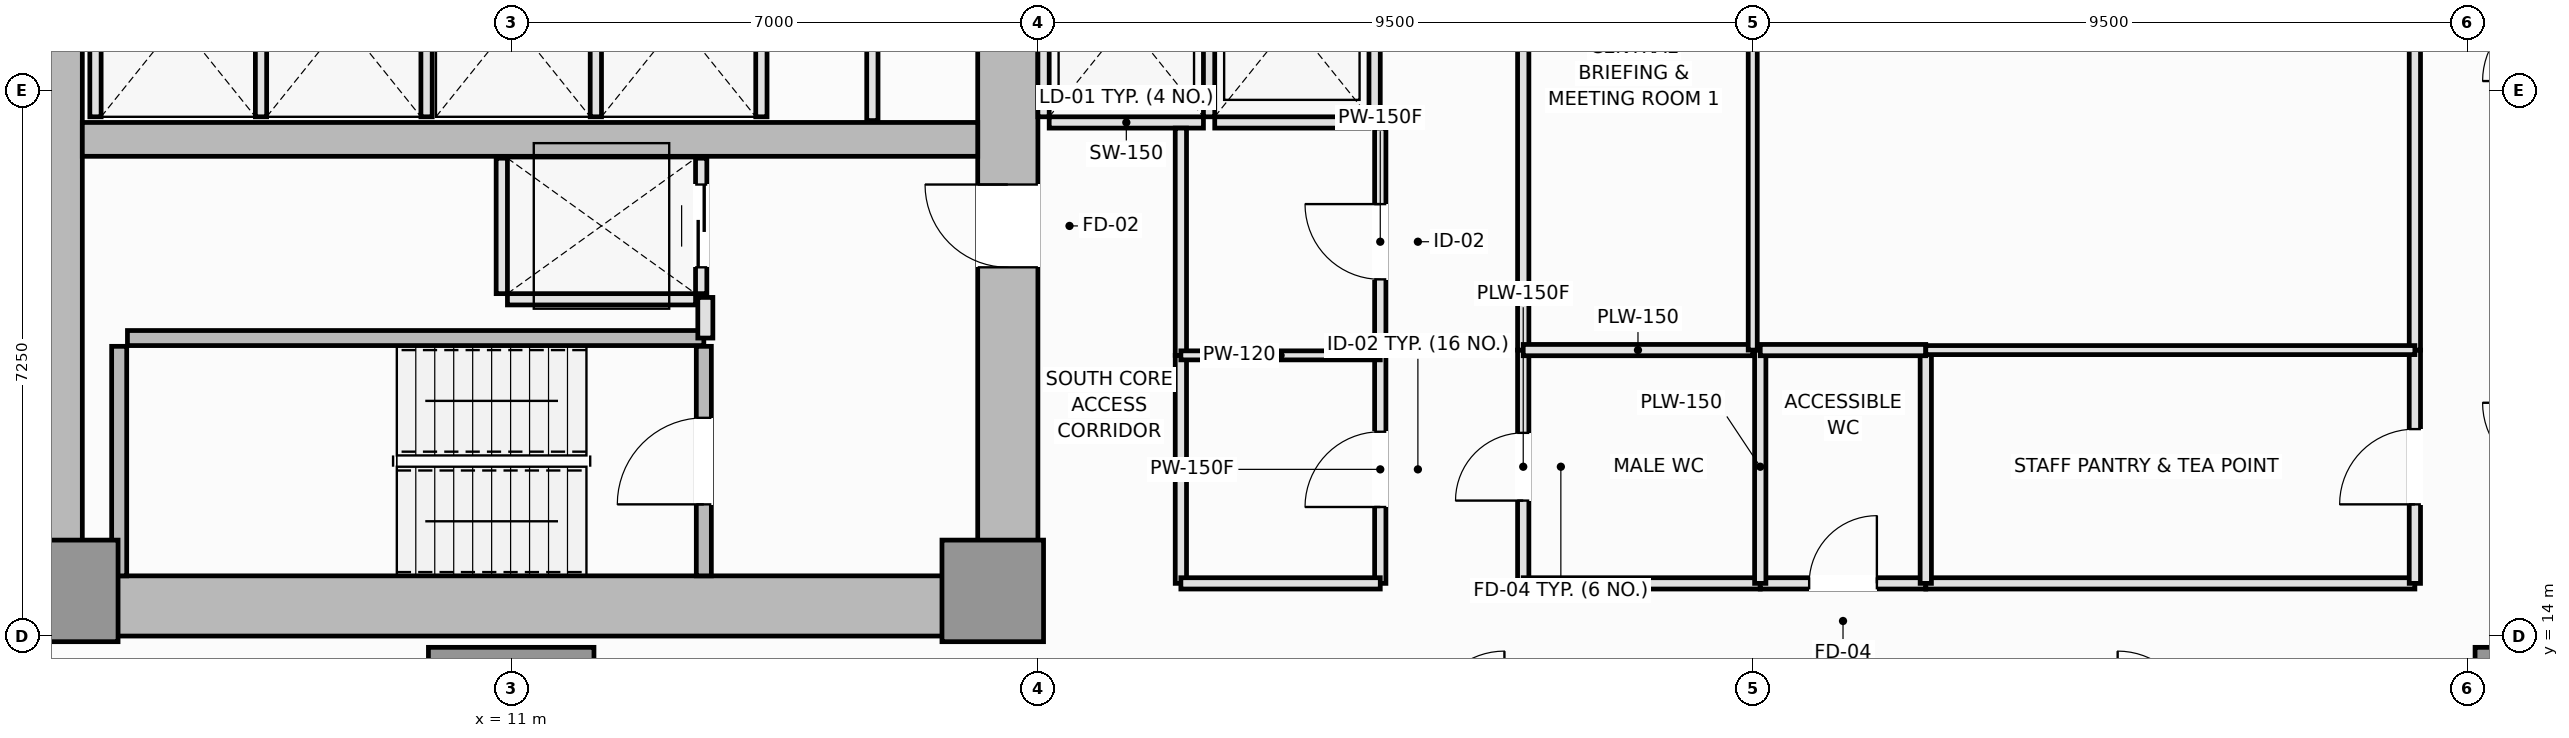
"""IFC4 building model, lengths in metres.
Left out: names, types, materials, properties, quantities, classifications, styles, units other than length and angle.
Written with IfcOpenShell. Run it as: python <this file> out.ifc"""

import sys

from ifc_helpers import new_model, si_unit, direction, frame, frame_2d, origin, origin_2d, place, context, subcontext, project, spatial, rectangle, extrude, element, fill, save


model = new_model("IFC4")
c1 = context("Model", 3, precision=1e-05, world=origin(), true_north=direction((0.0, 1.0)))
c2 = subcontext(c1, "Body", "Model", "MODEL_VIEW")
j1 = project(units=[si_unit("LENGTHUNIT", "METRE"), si_unit("PLANEANGLEUNIT", "RADIAN")], contexts=[c1])
p1 = place(None, origin())
s1 = spatial("IfcSite", under=j1, at=p1, CompositionType="ELEMENT")
p2 = place(p1, origin())
s2 = spatial("IfcBuilding", under=s1, at=p2, CompositionType="ELEMENT")
p3 = place(p2, frame((0.0, 0.0, 25.6)))
s3 = spatial("IfcBuildingStorey", under=s2, at=p3, CompositionType="ELEMENT", Elevation=25.6)
p4 = place(p3, frame((4.5, 14.4, 0.0), z_axis=(0.0, 0.0, 1.0), x_axis=(1.0, 0.0, 0.0)))
e1 = element("IfcWall", 1, at=p4, inside=s3, PredefinedType="SHEAR", context=c2, shape_type="SweptSolid", body=[
    extrude(rectangle(XDim=13.5, YDim=0.8, at=frame_2d((6.75, 0.0))), origin(), (0.0, 0.0, 1.0), 3.55),
])
p5 = place(p3, frame((4.9, 14.8, 0.0), z_axis=(0.0, 0.0, 1.0), x_axis=(0.0, 1.0, 0.0)))
e2 = element("IfcWall", 2, at=p5, inside=s3, PredefinedType="SHEAR", context=c2, shape_type="SweptSolid", body=[
    extrude(rectangle(XDim=20.9, YDim=0.8, at=frame_2d((10.45, 0.0))), origin(), (0.0, 0.0, 1.0), 3.55),
])
p6 = place(p3, frame((17.6, 14.8, 0.0), z_axis=(0.0, 0.0, 1.0), x_axis=(0.0, 1.0, 0.0)))
e3 = element("IfcWall", 3, at=p6, inside=s3, PredefinedType="SHEAR", context=c2, shape_type="SweptSolid", body=[
    extrude(rectangle(XDim=8.65, YDim=0.8, at=frame_2d((4.325, 0.0))), origin(), (0.0, 0.0, 1.0), 3.55),
])
p7 = place(p6, frame((4.1, 0.0, 0.0)))
e4 = element("IfcOpeningElement", 4, at=p7, cuts=e3, PredefinedType="OPENING", context=c2, shape_type="SweptSolid", body=[
    extrude(rectangle(XDim=1.1, YDim=2.15, at=frame_2d((0.55, 1.075))), frame((0.0, 0.41, 0.0), z_axis=(0.0, -1.0, 0.0), x_axis=(1.0, 0.0, 0.0)), (0.0, 0.0, 1.0), 0.82),
])
p8 = place(p3, frame((5.3, 20.6, 0.0), z_axis=(0.0, 0.0, 1.0), x_axis=(1.0, 0.0, 0.0)))
e5 = element("IfcWall", 5, at=p8, inside=s3, PredefinedType="SHEAR", context=c2, shape_type="SweptSolid", body=[
    extrude(rectangle(XDim=11.9, YDim=0.45, at=frame_2d((5.95, 0.0))), origin(), (0.0, 0.0, 1.0), 3.55),
])
for number, where, z_axis, x_axis in (
    (6, (5.1, 14.6, 0.0), (0.0, 0.0, 1.0), (1.0, 0.0, 0.0)),
    (7, (17.4, 14.6, 0.0), (0.0, 0.0, 1.0), (1.0, 0.0, 0.0)),
):
    element("IfcColumn", number, at=place(p3, frame(where, z_axis=z_axis, x_axis=x_axis)), inside=s3, PredefinedType="PILASTER", context=c2, shape_type="SweptSolid", body=[
        extrude(rectangle(XDim=1.35, YDim=1.35, at=origin_2d()), origin(), (0.0, 0.0, 1.0), 3.55),
    ])
for number, where, z_axis, x_axis in (
    (8, (11.0, 12.75, 0.0), (0.0, 0.0, 1.0), (1.0, 0.0, 0.0)),
    (9, (38.2, 12.75, 0.0), (0.0, 0.0, 1.0), (1.0, 0.0, 0.0)),
):
    element("IfcColumn", number, at=place(p3, frame(where, z_axis=z_axis, x_axis=x_axis)), inside=s3, PredefinedType="COLUMN", context=c2, shape_type="SweptSolid", body=[
        extrude(rectangle(XDim=2.2, YDim=2.2, at=origin_2d()), origin(), (0.0, 0.0, 1.0), 3.55),
    ])
p9 = place(p3, frame((5.79, 14.8, 0.0), z_axis=(0.0, 0.0, 1.0), x_axis=(0.0, 1.0, 0.0)))
e10 = element("IfcWall", 10, at=p9, inside=s3, PredefinedType="SOLIDWALL", context=c2, shape_type="SweptSolid", body=[
    extrude(rectangle(XDim=3.05, YDim=0.2, at=frame_2d((1.525, 0.0))), origin(), (0.0, 0.0, 1.0), 3.55),
])
p10 = place(p3, frame((5.9, 17.96, 0.0), z_axis=(0.0, 0.0, 1.0), x_axis=(1.0, 0.0, 0.0)))
e11 = element("IfcWall", 11, at=p10, inside=s3, PredefinedType="SOLIDWALL", context=c2, shape_type="SweptSolid", body=[
    extrude(rectangle(XDim=7.66, YDim=0.2, at=frame_2d((3.83, 0.0))), origin(), (0.0, 0.0, 1.0), 3.55),
])
p11 = place(p3, frame((13.56, 14.8, 0.0), z_axis=(0.0, 0.0, 1.0), x_axis=(0.0, 1.0, 0.0)))
e12 = element("IfcWall", 12, at=p11, inside=s3, PredefinedType="SOLIDWALL", context=c2, shape_type="SweptSolid", body=[
    extrude(rectangle(XDim=3.05, YDim=0.2, at=frame_2d((1.525, 0.0))), origin(), (0.0, 0.0, 1.0), 3.55),
])
p12 = place(p11, frame((0.95, 0.0, 0.0)))
e13 = element("IfcOpeningElement", 13, at=p12, cuts=e12, PredefinedType="OPENING", context=c2, shape_type="SweptSolid", body=[
    extrude(rectangle(XDim=1.15, YDim=2.15, at=frame_2d((0.575, 1.075))), frame((0.0, 0.11, 0.0), z_axis=(0.0, -1.0, 0.0), x_axis=(1.0, 0.0, 0.0)), (0.0, 0.0, 1.0), 0.22),
])
p13 = place(p3, frame((18.15, 20.825, 0.0), z_axis=(0.0, 0.0, 1.0), x_axis=(1.0, 0.0, 0.0)))
e14 = element("IfcWall", 14, at=p13, inside=s3, PredefinedType="PARTITIONING", context=c2, shape_type="SweptSolid", body=[
    extrude(rectangle(XDim=2.05, YDim=0.15, at=frame_2d((1.025, 0.0))), origin(), (0.0, 0.0, 1.0), 3.37),
])
for number, where, z_axis, x_axis in (
    (15, (18.075, 20.9, 0.0), (0.0, 0.0, 1.0), (0.0, 1.0, 0.0)),
    (16, (20.275, 20.9, 0.0), (0.0, 0.0, 1.0), (0.0, 1.0, 0.0)),
):
    element("IfcWall", number, at=place(p3, frame(where, z_axis=z_axis, x_axis=x_axis)), inside=s3, PredefinedType="PARTITIONING", context=c2, shape_type="SweptSolid", body=[
        extrude(rectangle(XDim=2.55, YDim=0.15, at=frame_2d((1.275, 0.0))), origin(), (0.0, 0.0, 1.0), 3.37),
    ])
p14 = place(p3, frame((20.35, 20.825, 0.0), z_axis=(0.0, 0.0, 1.0), x_axis=(1.0, 0.0, 0.0)))
e17 = element("IfcWall", 17, at=p14, inside=s3, PredefinedType="PARTITIONING", context=c2, shape_type="SweptSolid", body=[
    extrude(rectangle(XDim=2.05, YDim=0.15, at=frame_2d((1.025, 0.0))), origin(), (0.0, 0.0, 1.0), 3.37),
])
for number, where, z_axis, x_axis in (
    (18, (22.475, 20.9, 0.0), (0.0, 0.0, 1.0), (0.0, 1.0, 0.0)),
    (19, (5.475, 20.9, 0.0), (0.0, 0.0, 1.0), (0.0, 1.0, 0.0)),
    (20, (7.675, 20.9, 0.0), (0.0, 0.0, 1.0), (0.0, 1.0, 0.0)),
    (21, (9.875, 20.9, 0.0), (0.0, 0.0, 1.0), (0.0, 1.0, 0.0)),
    (22, (12.125, 20.9, 0.0), (0.0, 0.0, 1.0), (0.0, 1.0, 0.0)),
    (23, (14.325, 20.9, 0.0), (0.0, 0.0, 1.0), (0.0, 1.0, 0.0)),
):
    element("IfcWall", number, at=place(p3, frame(where, z_axis=z_axis, x_axis=x_axis)), inside=s3, PredefinedType="PARTITIONING", context=c2, shape_type="SweptSolid", body=[
        extrude(rectangle(XDim=2.55, YDim=0.15, at=frame_2d((1.275, 0.0))), origin(), (0.0, 0.0, 1.0), 3.37),
    ])
p15 = place(p3, frame((10.95, 18.475, 0.0), z_axis=(0.0, 0.0, 1.0), x_axis=(1.0, 0.0, 0.0)))
e24 = element("IfcWall", 24, at=p15, inside=s3, PredefinedType="PARTITIONING", context=c2, shape_type="SweptSolid", body=[
    extrude(rectangle(XDim=2.5, YDim=0.15, at=frame_2d((1.25, 0.0))), origin(), (0.0, 0.0, 1.0), 3.37),
])
p16 = place(p3, frame((10.875, 18.55, 0.0), z_axis=(0.0, 0.0, 1.0), x_axis=(0.0, 1.0, 0.0)))
e25 = element("IfcWall", 25, at=p16, inside=s3, PredefinedType="PARTITIONING", context=c2, shape_type="SweptSolid", body=[
    extrude(rectangle(XDim=1.8, YDim=0.15, at=frame_2d((0.9, 0.0))), origin(), (0.0, 0.0, 1.0), 3.37),
])
p17 = place(p3, frame((13.525, 18.55, 0.0), z_axis=(0.0, 0.0, 1.0), x_axis=(0.0, 1.0, 0.0)))
e26 = element("IfcWall", 26, at=p17, inside=s3, PredefinedType="PARTITIONING", context=c2, shape_type="SweptSolid", body=[
    extrude(rectangle(XDim=1.8, YDim=0.15, at=frame_2d((0.9, 0.0))), origin(), (0.0, 0.0, 1.0), 3.37),
])
p18 = place(p17, frame((0.35, 0.0, 0.0)))
e27 = element("IfcOpeningElement", 27, at=p18, cuts=e26, PredefinedType="OPENING", context=c2, shape_type="SweptSolid", body=[
    extrude(rectangle(XDim=1.1, YDim=2.2, at=frame_2d((0.55, 1.1))), frame((0.0, 0.085, 0.0), z_axis=(0.0, -1.0, 0.0), x_axis=(1.0, 0.0, 0.0)), (0.0, 0.0, 1.0), 0.17),
])
p19 = place(p3, frame((13.58, 17.96, 0.0), z_axis=(0.0, 0.0, 1.0), x_axis=(0.0, 1.0, 0.0)))
e28 = element("IfcWall", 28, at=p19, inside=s3, PredefinedType="PARTITIONING", context=c2, shape_type="SweptSolid", body=[
    extrude(rectangle(XDim=0.54, YDim=0.2, at=frame_2d((0.27, 0.0))), origin(), (0.0, 0.0, 1.0), 3.37),
])
p20 = place(p3, frame((15.8, 20.85, 0.0), z_axis=(0.0, 0.0, 1.0), x_axis=(0.0, 1.0, 0.0)))
e29 = element("IfcWall", 29, at=p20, inside=s3, PredefinedType="PARTITIONING", context=c2, shape_type="SweptSolid", body=[
    extrude(rectangle(XDim=2.67, YDim=0.15, at=frame_2d((1.335, 0.0))), origin(), (0.0, 0.0, 1.0), 3.37),
])
p21 = place(p3, frame((22.55, 14.7, 0.0), z_axis=(0.0, 0.0, 1.0), x_axis=(0.0, 1.0, 0.0)))
e30 = element("IfcWall", 30, at=p21, inside=s3, PredefinedType="PARTITIONING", context=c2, shape_type="SweptSolid", body=[
    extrude(rectangle(XDim=3.03, YDim=0.15, at=frame_2d((1.515, 0.0))), origin(), (0.0, 0.0, 1.0), 3.01),
])
p22 = place(p21, frame((1.015, 0.0, 0.0)))
e31 = element("IfcOpeningElement", 31, at=p22, cuts=e30, PredefinedType="OPENING", context=c2, shape_type="SweptSolid", body=[
    extrude(rectangle(XDim=1.0, YDim=2.15, at=frame_2d((0.5, 1.075))), frame((0.0, 0.085, 0.0), z_axis=(0.0, -1.0, 0.0), x_axis=(1.0, 0.0, 0.0)), (0.0, 0.0, 1.0), 0.17),
])
p23 = place(p3, frame((22.55, 17.73, 0.0), z_axis=(0.0, 0.0, 1.0), x_axis=(0.0, 1.0, 0.0)))
e32 = element("IfcWall", 32, at=p23, inside=s3, PredefinedType="PARTITIONING", context=c2, shape_type="SweptSolid", body=[
    extrude(rectangle(XDim=3.02, YDim=0.15, at=frame_2d((1.51, 0.0))), origin(), (0.0, 0.0, 1.0), 3.01),
])
p24 = place(p23, frame((1.01, 0.0, 0.0)))
e33 = element("IfcOpeningElement", 33, at=p24, cuts=e32, PredefinedType="OPENING", context=c2, shape_type="SweptSolid", body=[
    extrude(rectangle(XDim=1.0, YDim=2.15, at=frame_2d((0.5, 1.075))), frame((0.0, 0.085, 0.0), z_axis=(0.0, -1.0, 0.0), x_axis=(1.0, 0.0, 0.0)), (0.0, 0.0, 1.0), 0.17),
])
p25 = place(p3, frame((24.45, 14.7, 0.0), z_axis=(0.0, 0.0, 1.0), x_axis=(0.0, 1.0, 0.0)))
e34 = element("IfcWall", 34, at=p25, inside=s3, PredefinedType="PLUMBINGWALL", context=c2, shape_type="SweptSolid", body=[
    extrude(rectangle(XDim=3.1, YDim=0.15, at=frame_2d((1.55, 0.0))), origin(), (0.0, 0.0, 1.0), 3.37),
])
p26 = place(p25, frame((1.1, 0.0, 0.0)))
e35 = element("IfcOpeningElement", 35, at=p26, cuts=e34, PredefinedType="OPENING", context=c2, shape_type="SweptSolid", body=[
    extrude(rectangle(XDim=0.9, YDim=2.1, at=frame_2d((0.45, 1.05))), frame((0.0, 0.085, 0.0), z_axis=(0.0, -1.0, 0.0), x_axis=(1.0, 0.0, 0.0)), (0.0, 0.0, 1.0), 0.17),
])
p27 = place(p3, frame((24.45, 17.8, 0.0), z_axis=(0.0, 0.0, 1.0), x_axis=(0.0, 1.0, 0.0)))
e36 = element("IfcWall", 36, at=p27, inside=s3, PredefinedType="PARTITIONING", context=c2, shape_type="SweptSolid", body=[
    extrude(rectangle(XDim=14.9, YDim=0.15, at=frame_2d((7.45, 0.0))), origin(), (0.0, 0.0, 1.0), 3.37),
])
p28 = place(p27, frame((6.95, 0.0, 0.0)))
e37 = element("IfcOpeningElement", 37, at=p28, cuts=e36, PredefinedType="OPENING", context=c2, shape_type="SweptSolid", body=[
    extrude(rectangle(XDim=1.0, YDim=2.15, at=frame_2d((0.5, 1.075))), frame((0.0, 0.085, 0.0), z_axis=(0.0, -1.0, 0.0), x_axis=(1.0, 0.0, 0.0)), (0.0, 0.0, 1.0), 0.17),
])
p29 = place(p3, frame((19.9, 14.7, 0.0), z_axis=(0.0, 0.0, 1.0), x_axis=(0.0, 1.0, 0.0)))
e38 = element("IfcWall", 38, at=p29, inside=s3, PredefinedType="PARTITIONING", context=c2, shape_type="SweptSolid", body=[
    extrude(rectangle(XDim=3.03, YDim=0.15, at=frame_2d((1.515, 0.0))), origin(), (0.0, 0.0, 1.0), 3.37),
])
p30 = place(p3, frame((19.9, 17.73, 0.0), z_axis=(0.0, 0.0, 1.0), x_axis=(0.0, 1.0, 0.0)))
e39 = element("IfcWall", 39, at=p30, inside=s3, PredefinedType="PARTITIONING", context=c2, shape_type="SweptSolid", body=[
    extrude(rectangle(XDim=3.02, YDim=0.15, at=frame_2d((1.51, 0.0))), origin(), (0.0, 0.0, 1.0), 3.37),
])
p31 = place(p3, frame((19.9, 14.7, 0.0), z_axis=(0.0, 0.0, 1.0), x_axis=(1.0, 0.0, 0.0)))
e40 = element("IfcWall", 40, at=p31, inside=s3, PredefinedType="PARTITIONING", context=c2, shape_type="SweptSolid", body=[
    extrude(rectangle(XDim=2.65, YDim=0.15, at=frame_2d((1.325, 0.0))), origin(), (0.0, 0.0, 1.0), 3.37),
])
p32 = place(p3, frame((24.45, 14.7, 0.0), z_axis=(0.0, 0.0, 1.0), x_axis=(1.0, 0.0, 0.0)))
e41 = element("IfcWall", 41, at=p32, inside=s3, PredefinedType="PLUMBINGWALL", context=c2, shape_type="SweptSolid", body=[
    extrude(rectangle(XDim=3.15, YDim=0.15, at=frame_2d((1.575, 0.0))), origin(), (0.0, 0.0, 1.0), 3.37),
])
p33 = place(p3, frame((27.6, 14.7, 0.0), z_axis=(0.0, 0.0, 1.0), x_axis=(1.0, 0.0, 0.0)))
e42 = element("IfcWall", 42, at=p33, inside=s3, PredefinedType="PLUMBINGWALL", context=c2, shape_type="SweptSolid", body=[
    extrude(rectangle(XDim=2.2, YDim=0.15, at=frame_2d((1.1, 0.0))), origin(), (0.0, 0.0, 1.0), 3.37),
])
p34 = place(p33, frame((0.65, 0.0, 0.0)))
e43 = element("IfcOpeningElement", 43, at=p34, cuts=e42, PredefinedType="OPENING", context=c2, shape_type="SweptSolid", body=[
    extrude(rectangle(XDim=0.9, YDim=2.1, at=frame_2d((0.45, 1.05))), frame((0.0, 0.085, 0.0), z_axis=(0.0, -1.0, 0.0), x_axis=(1.0, 0.0, 0.0)), (0.0, 0.0, 1.0), 0.17),
])
p35 = place(p3, frame((29.8, 14.7, 0.0), z_axis=(0.0, 0.0, 1.0), x_axis=(1.0, 0.0, 0.0)))
e44 = element("IfcWall", 44, at=p35, inside=s3, PredefinedType="PARTITIONING", context=c2, shape_type="SweptSolid", body=[
    extrude(rectangle(XDim=6.5, YDim=0.15, at=frame_2d((3.25, 0.0))), origin(), (0.0, 0.0, 1.0), 3.37),
])
p36 = place(p3, frame((36.3, 14.7, 0.0), z_axis=(0.0, 0.0, 1.0), x_axis=(0.0, 1.0, 0.0)))
e45 = element("IfcWall", 45, at=p36, inside=s3, PredefinedType="PARTITIONING", context=c2, shape_type="SweptSolid", body=[
    extrude(rectangle(XDim=3.1, YDim=0.15, at=frame_2d((1.55, 0.0))), origin(), (0.0, 0.0, 1.0), 3.37),
])
p37 = place(p36, frame((1.05, 0.0, 0.0)))
e46 = element("IfcOpeningElement", 46, at=p37, cuts=e45, PredefinedType="OPENING", context=c2, shape_type="SweptSolid", body=[
    extrude(rectangle(XDim=1.0, YDim=2.15, at=frame_2d((0.5, 1.075))), frame((0.0, 0.085, 0.0), z_axis=(0.0, -1.0, 0.0), x_axis=(1.0, 0.0, 0.0)), (0.0, 0.0, 1.0), 0.17),
])
p38 = place(p3, frame((36.3, 17.8, 0.0), z_axis=(0.0, 0.0, 1.0), x_axis=(0.0, 1.0, 0.0)))
e47 = element("IfcWall", 47, at=p38, inside=s3, PredefinedType="PARTITIONING", context=c2, shape_type="SweptSolid", body=[
    extrude(rectangle(XDim=14.9, YDim=0.15, at=frame_2d((7.45, 0.0))), origin(), (0.0, 0.0, 1.0), 3.37),
])
p39 = place(p38, frame((8.364, 0.0, 0.0)))
e48 = element("IfcOpeningElement", 48, at=p39, cuts=e47, PredefinedType="OPENING", context=c2, shape_type="SweptSolid", body=[
    extrude(rectangle(XDim=1.0, YDim=2.15, at=frame_2d((0.5, 1.075))), frame((0.0, 0.085, 0.0), z_axis=(0.0, -1.0, 0.0), x_axis=(1.0, 0.0, 0.0)), (0.0, 0.0, 1.0), 0.17),
])
p40 = place(p3, frame((19.9, 17.73, 0.0), z_axis=(0.0, 0.0, 1.0), x_axis=(1.0, 0.0, 0.0)))
e49 = element("IfcWall", 49, at=p40, inside=s3, PredefinedType="PARTITIONING", context=c2, shape_type="SweptSolid", body=[
    extrude(rectangle(XDim=2.65, YDim=0.12, at=frame_2d((1.325, 0.0))), origin(), (0.0, 0.0, 1.0), 3.37),
])
p41 = place(p3, frame((27.6, 14.7, 0.0), z_axis=(0.0, 0.0, 1.0), x_axis=(0.0, 1.0, 0.0)))
e50 = element("IfcWall", 50, at=p41, inside=s3, PredefinedType="PLUMBINGWALL", context=c2, shape_type="SweptSolid", body=[
    extrude(rectangle(XDim=3.1, YDim=0.15, at=frame_2d((1.55, 0.0))), origin(), (0.0, 0.0, 1.0), 3.37),
])
p42 = place(p3, frame((24.45, 17.8, 0.0), z_axis=(0.0, 0.0, 1.0), x_axis=(1.0, 0.0, 0.0)))
e51 = element("IfcWall", 51, at=p42, inside=s3, PredefinedType="PLUMBINGWALL", context=c2, shape_type="SweptSolid", body=[
    extrude(rectangle(XDim=3.05, YDim=0.15, at=frame_2d((1.525, 0.0))), origin(), (0.0, 0.0, 1.0), 3.37),
])
p43 = place(p3, frame((29.8, 14.7, 0.0), z_axis=(0.0, 0.0, 1.0), x_axis=(0.0, 1.0, 0.0)))
e52 = element("IfcWall", 52, at=p43, inside=s3, PredefinedType="PLUMBINGWALL", context=c2, shape_type="SweptSolid", body=[
    extrude(rectangle(XDim=3.1, YDim=0.15, at=frame_2d((1.55, 0.0))), origin(), (0.0, 0.0, 1.0), 3.37),
])
p44 = place(p3, frame((27.6, 17.8, 0.0), z_axis=(0.0, 0.0, 1.0), x_axis=(1.0, 0.0, 0.0)))
e53 = element("IfcWall", 53, at=p44, inside=s3, PredefinedType="PLUMBINGWALL", context=c2, shape_type="SweptSolid", body=[
    extrude(rectangle(XDim=2.2, YDim=0.15, at=frame_2d((1.1, 0.0))), origin(), (0.0, 0.0, 1.0), 3.37),
])
p45 = place(p3, frame((29.8, 17.8, 0.0), z_axis=(0.0, 0.0, 1.0), x_axis=(1.0, 0.0, 0.0)))
e54 = element("IfcWall", 54, at=p45, inside=s3, PredefinedType="PARTITIONING", context=c2, shape_type="SweptSolid", body=[
    extrude(rectangle(XDim=6.5, YDim=0.12, at=frame_2d((3.25, 0.0))), origin(), (0.0, 0.0, 1.0), 3.37),
])
p46 = place(p3, frame((27.5, 17.8, 0.0), z_axis=(0.0, 0.0, 1.0), x_axis=(0.0, 1.0, 0.0)))
e55 = element("IfcWall", 55, at=p46, inside=s3, PredefinedType="PARTITIONING", context=c2, shape_type="SweptSolid", body=[
    extrude(rectangle(XDim=14.9, YDim=0.12, at=frame_2d((7.45, 0.0))), origin(), (0.0, 0.0, 1.0), 3.37),
])
p47 = place(p12, origin())
e56 = element("IfcDoor", 56, at=p47, inside=s3, OperationType="SINGLE_SWING_LEFT", PredefinedType="DOOR", context=c2, shape_type="SweptSolid", body=[
    extrude(rectangle(XDim=1.15, YDim=2.15, at=frame_2d((0.575, 1.075))), frame((0.0, 0.025, 0.0), z_axis=(0.0, -1.0, 0.0), x_axis=(1.0, 0.0, 0.0)), (0.0, 0.0, 1.0), 0.05),
])
fill(e13, e56)
p48 = place(p18, origin())
e57 = element("IfcDoor", 57, at=p48, inside=s3, OperationType="DOUBLE_DOOR_SLIDING", PredefinedType="DOOR", context=c2, shape_type="SweptSolid", body=[
    extrude(rectangle(XDim=1.1, YDim=2.2, at=frame_2d((0.55, 1.1))), frame((0.0, 0.025, 0.0), z_axis=(0.0, -1.0, 0.0), x_axis=(1.0, 0.0, 0.0)), (0.0, 0.0, 1.0), 0.05),
])
fill(e27, e57)
p49 = place(p7, origin())
e58 = element("IfcDoor", 58, at=p49, inside=s3, OperationType="SINGLE_SWING_RIGHT", PredefinedType="DOOR", context=c2, shape_type="SweptSolid", body=[
    extrude(rectangle(XDim=1.1, YDim=2.15, at=frame_2d((0.55, 1.075))), frame((0.0, 0.025, 0.0), z_axis=(0.0, -1.0, 0.0), x_axis=(1.0, 0.0, 0.0)), (0.0, 0.0, 1.0), 0.05),
])
fill(e4, e58)
p50 = place(p22, origin())
e59 = element("IfcDoor", 59, at=p50, inside=s3, OperationType="SINGLE_SWING_LEFT", PredefinedType="DOOR", context=c2, shape_type="SweptSolid", body=[
    extrude(rectangle(XDim=1.0, YDim=2.15, at=frame_2d((0.5, 1.075))), frame((0.0, 0.025, 0.0), z_axis=(0.0, -1.0, 0.0), x_axis=(1.0, 0.0, 0.0)), (0.0, 0.0, 1.0), 0.05),
])
fill(e31, e59)
p51 = place(p24, origin())
e60 = element("IfcDoor", 60, at=p51, inside=s3, OperationType="SINGLE_SWING_RIGHT", PredefinedType="DOOR", context=c2, shape_type="SweptSolid", body=[
    extrude(rectangle(XDim=1.0, YDim=2.15, at=frame_2d((0.5, 1.075))), frame((0.0, 0.025, 0.0), z_axis=(0.0, -1.0, 0.0), x_axis=(1.0, 0.0, 0.0)), (0.0, 0.0, 1.0), 0.05),
])
fill(e33, e60)
p52 = place(p26, origin())
e61 = element("IfcDoor", 61, at=p52, inside=s3, OperationType="SINGLE_SWING_LEFT", PredefinedType="DOOR", context=c2, shape_type="SweptSolid", body=[
    extrude(rectangle(XDim=0.9, YDim=2.1, at=frame_2d((0.45, 1.05))), frame((0.0, 0.025, 0.0), z_axis=(0.0, -1.0, 0.0), x_axis=(1.0, 0.0, 0.0)), (0.0, 0.0, 1.0), 0.05),
])
fill(e35, e61)
p53 = place(p34, origin())
e62 = element("IfcDoor", 62, at=p53, inside=s3, OperationType="SINGLE_SWING_RIGHT", PredefinedType="DOOR", context=c2, shape_type="SweptSolid", body=[
    extrude(rectangle(XDim=0.9, YDim=2.1, at=frame_2d((0.45, 1.05))), frame((0.0, 0.025, 0.0), z_axis=(0.0, -1.0, 0.0), x_axis=(1.0, 0.0, 0.0)), (0.0, 0.0, 1.0), 0.05),
])
fill(e43, e62)
p54 = place(p37, origin())
e63 = element("IfcDoor", 63, at=p54, inside=s3, OperationType="SINGLE_SWING_LEFT", PredefinedType="DOOR", context=c2, shape_type="SweptSolid", body=[
    extrude(rectangle(XDim=1.0, YDim=2.15, at=frame_2d((0.5, 1.075))), frame((0.0, 0.025, 0.0), z_axis=(0.0, -1.0, 0.0), x_axis=(1.0, 0.0, 0.0)), (0.0, 0.0, 1.0), 0.05),
])
fill(e46, e63)
save(model, sys.argv[1])
